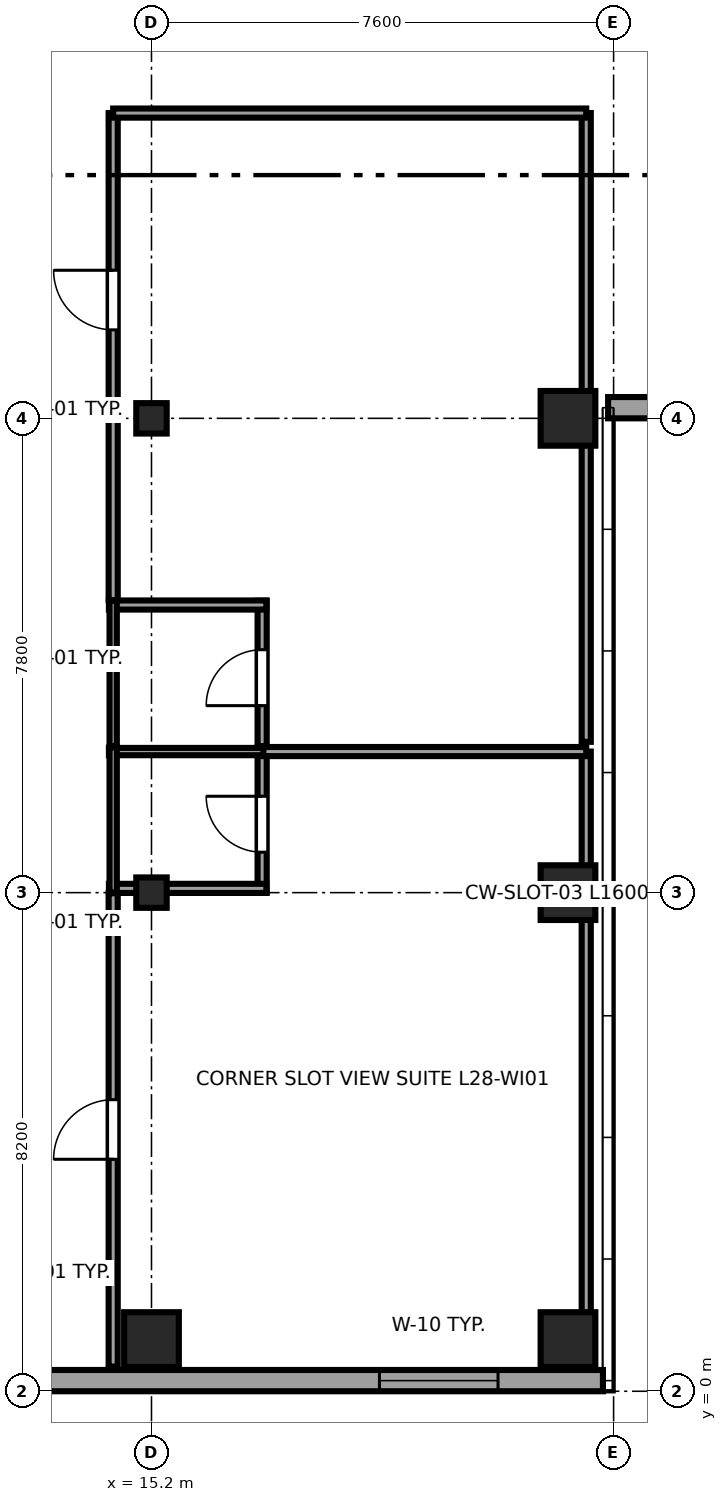
"""IFC4 building model, lengths in metres.
Left out: names, types, materials, properties, quantities, classifications, styles, units other than length and angle.
Written with IfcOpenShell. Run it as: python <this file> out.ifc"""

import sys

from ifc_helpers import new_model, si_unit, direction, frame, frame_2d, origin, origin_2d, place, context, subcontext, project, spatial, rectangle, i_section, extrude, source, transform, mapped, element, fill, save


model = new_model("IFC4")
c1 = context("Model", 3, precision=1e-05, world=origin(), true_north=direction((0.0, 1.0)))
c2 = subcontext(c1, "Body", "Model", "MODEL_VIEW")
j1 = project(units=[si_unit("LENGTHUNIT", "METRE"), si_unit("PLANEANGLEUNIT", "RADIAN")], contexts=[c1])
p1 = place(None, origin())
s1 = spatial("IfcSite", under=j1, at=p1, CompositionType="ELEMENT")
p2 = place(p1, origin())
s2 = spatial("IfcBuilding", under=s1, at=p2, CompositionType="ELEMENT")
p3 = place(p2, frame((0.0, 0.0, 111.55)))
s3 = spatial("IfcBuildingStorey", under=s2, at=p3, CompositionType="ELEMENT", Elevation=111.55)
m1 = source(origin(), c2, "Body", "SweptSolid", [
    extrude(rectangle(XDim=0.9, YDim=0.9, at=origin_2d()), origin(), (0.0, 0.0, 1.0), 3.55),
])
p4 = place(p3, frame((15.2, 0.85, 0.0), z_axis=(0.0, 0.0, 1.0), x_axis=(1.0, 0.0, 0.0)))
e1 = element("IfcColumn", 1, at=p4, inside=s3, PredefinedType="COLUMN", context=c2, shape_type="MappedRepresentation", body=[
    mapped(m1, transform((0.0, 0.0, 0.0), x_axis=(1.0, 0.0, 0.0), y_axis=(0.0, 1.0, 0.0), z_axis=(0.0, 0.0, 1.0), scale=1.0)),
])
m2 = source(origin(), c2, "Body", "SweptSolid", [
    extrude(i_section(OverallWidth=0.5, OverallDepth=0.5, WebThickness=0.022, FlangeThickness=0.034, at=origin_2d()), origin(), (0.0, 0.0, 1.0), 3.55),
])
for number, where, z_axis, x_axis in (
    (2, (15.2, 8.2, 0.0), (0.0, 0.0, 1.0), (1.0, 0.0, 0.0)),
    (3, (15.2, 16.0, 0.0), (0.0, 0.0, 1.0), (1.0, 0.0, 0.0)),
):
    element("IfcColumn", number, at=place(p3, frame(where, z_axis=z_axis, x_axis=x_axis)), inside=s3, PredefinedType="COLUMN", context=c2, shape_type="MappedRepresentation", body=[
        mapped(m2, transform((0.0, 0.0, 0.0), x_axis=(1.0, 0.0, 0.0), y_axis=(0.0, 1.0, 0.0), z_axis=(0.0, 0.0, 1.0), scale=1.0)),
    ])
for number, where, z_axis, x_axis in (
    (4, (22.05, 0.85, 0.0), (0.0, 0.0, 1.0), (1.0, 0.0, 0.0)),
    (5, (22.05, 8.2, 0.0), (0.0, 0.0, 1.0), (1.0, 0.0, 0.0)),
    (6, (22.05, 16.0, 0.0), (0.0, 0.0, 1.0), (1.0, 0.0, 0.0)),
):
    element("IfcColumn", number, at=place(p3, frame(where, z_axis=z_axis, x_axis=x_axis)), inside=s3, PredefinedType="COLUMN", context=c2, shape_type="MappedRepresentation", body=[
        mapped(m1, transform((0.0, 0.0, 0.0), x_axis=(1.0, 0.0, 0.0), y_axis=(0.0, 1.0, 0.0), z_axis=(0.0, 0.0, 1.0), scale=1.0)),
    ])
p5 = place(p3, frame((4.617, 0.175, 0.0), z_axis=(0.0, 0.0, 1.0), x_axis=(1.0, 0.0, 0.0)))
e7 = element("IfcWall", 7, at=p5, inside=s3, PredefinedType="SOLIDWALL", context=c2, shape_type="SweptSolid", body=[
    extrude(rectangle(XDim=18.008, YDim=0.35, at=frame_2d((9.004, 0.0))), origin(), (0.0, 0.0, 1.0), 3.37),
])
p6 = place(p5, frame((5.378, 0.0, 0.68)))
e8 = element("IfcOpeningElement", 8, at=p6, cuts=e7, PredefinedType="OPENING", context=c2, shape_type="SweptSolid", body=[
    extrude(rectangle(XDim=1.95, YDim=1.82, at=frame_2d((0.975, 0.91))), frame((0.0, 0.185, 0.0), z_axis=(0.0, -1.0, 0.0), x_axis=(1.0, 0.0, 0.0)), (0.0, 0.0, 1.0), 0.37),
])
p7 = place(p5, frame((14.332, 0.0, 0.68)))
e9 = element("IfcOpeningElement", 9, at=p7, cuts=e7, PredefinedType="OPENING", context=c2, shape_type="SweptSolid", body=[
    extrude(rectangle(XDim=1.95, YDim=1.82, at=frame_2d((0.975, 0.91))), frame((0.0, 0.185, 0.0), z_axis=(0.0, -1.0, 0.0), x_axis=(1.0, 0.0, 0.0)), (0.0, 0.0, 1.0), 0.37),
])
p8 = place(p3, frame((22.71, 16.175, 0.0), z_axis=(0.0, 0.0, 1.0), x_axis=(1.0, 0.0, 0.0)))
e10 = element("IfcWall", 10, at=p8, inside=s3, PredefinedType="SOLIDWALL", context=c2, shape_type="SweptSolid", body=[
    extrude(rectangle(XDim=11.58, YDim=0.35, at=frame_2d((5.79, 0.0))), origin(), (0.0, 0.0, 1.0), 2.748),
])
p9 = place(p8, frame((2.22, 0.0, 0.68)))
e11 = element("IfcOpeningElement", 11, at=p9, cuts=e10, PredefinedType="OPENING", context=c2, shape_type="SweptSolid", body=[
    extrude(rectangle(XDim=1.95, YDim=1.82, at=frame_2d((0.975, 0.91))), frame((0.0, 0.185, 0.0), z_axis=(0.0, -1.0, 0.0), x_axis=(1.0, 0.0, 0.0)), (0.0, 0.0, 1.0), 0.37),
])
p10 = place(p8, frame((7.41, 0.0, 0.68)))
e12 = element("IfcOpeningElement", 12, at=p10, cuts=e10, PredefinedType="OPENING", context=c2, shape_type="SweptSolid", body=[
    extrude(rectangle(XDim=1.95, YDim=1.82, at=frame_2d((0.975, 0.91))), frame((0.0, 0.185, 0.0), z_axis=(0.0, -1.0, 0.0), x_axis=(1.0, 0.0, 0.0)), (0.0, 0.0, 1.0), 0.37),
])
p11 = place(p3, frame((17.02, 8.2, 0.0), z_axis=(0.0, 0.0, 1.0), x_axis=(0.0, 1.0, 0.0)))
e13 = element("IfcWall", 13, at=p11, inside=s3, PredefinedType="PARTITIONING", context=c2, shape_type="SweptSolid", body=[
    extrude(rectangle(XDim=2.39, YDim=0.15, at=frame_2d((1.195, 0.0))), origin(), (0.0, 0.0, 1.0), 3.37),
])
p12 = place(p11, frame((0.665, 0.0, 0.0)))
e14 = element("IfcOpeningElement", 14, at=p12, cuts=e13, PredefinedType="OPENING", context=c2, shape_type="SweptSolid", body=[
    extrude(rectangle(XDim=0.92, YDim=2.01, at=frame_2d((0.46, 1.005))), frame((0.0, 0.085, 0.0), z_axis=(0.0, -1.0, 0.0), x_axis=(1.0, 0.0, 0.0)), (0.0, 0.0, 1.0), 0.17),
])
p13 = place(p3, frame((14.5, 8.27, 0.0), z_axis=(0.0, 0.0, 1.0), x_axis=(1.0, 0.0, 0.0)))
e15 = element("IfcWall", 15, at=p13, inside=s3, PredefinedType="PARTITIONING", context=c2, shape_type="SweptSolid", body=[
    extrude(rectangle(XDim=2.59, YDim=0.15, at=frame_2d((1.295, 0.0))), origin(), (0.0, 0.0, 1.0), 2.748),
])
p14 = place(p3, frame((14.5, 10.52, 0.0), z_axis=(0.0, 0.0, 1.0), x_axis=(1.0, 0.0, 0.0)))
e16 = element("IfcWall", 16, at=p14, inside=s3, PredefinedType="PLUMBINGWALL", context=c2, shape_type="SweptSolid", body=[
    extrude(rectangle(XDim=2.59, YDim=0.12, at=frame_2d((1.295, 0.0))), origin(), (0.0, 0.0, 1.0), 3.37),
])
p15 = place(p3, frame((14.57, 8.2, 0.0), z_axis=(0.0, 0.0, 1.0), x_axis=(0.0, 1.0, 0.0)))
e17 = element("IfcWall", 17, at=p15, inside=s3, PredefinedType="PLUMBINGWALL", context=c2, shape_type="SweptSolid", body=[
    extrude(rectangle(XDim=2.39, YDim=0.12, at=frame_2d((1.195, 0.0))), origin(), (0.0, 0.0, 1.0), 3.37),
])
p16 = place(p3, frame((17.02, 10.61, 0.0), z_axis=(0.0, 0.0, 1.0), x_axis=(0.0, 1.0, 0.0)))
e18 = element("IfcWall", 18, at=p16, inside=s3, PredefinedType="PARTITIONING", context=c2, shape_type="SweptSolid", body=[
    extrude(rectangle(XDim=2.39, YDim=0.15, at=frame_2d((1.195, 0.0))), origin(), (0.0, 0.0, 1.0), 3.37),
])
p17 = place(p16, frame((0.665, 0.0, 0.0)))
e19 = element("IfcOpeningElement", 19, at=p17, cuts=e18, PredefinedType="OPENING", context=c2, shape_type="SweptSolid", body=[
    extrude(rectangle(XDim=0.92, YDim=2.01, at=frame_2d((0.46, 1.005))), frame((0.0, 0.085, 0.0), z_axis=(0.0, -1.0, 0.0), x_axis=(1.0, 0.0, 0.0)), (0.0, 0.0, 1.0), 0.17),
])
p18 = place(p3, frame((14.5, 12.93, 0.0), z_axis=(0.0, 0.0, 1.0), x_axis=(1.0, 0.0, 0.0)))
e20 = element("IfcWall", 20, at=p18, inside=s3, PredefinedType="PARTITIONING", context=c2, shape_type="SweptSolid", body=[
    extrude(rectangle(XDim=2.59, YDim=0.15, at=frame_2d((1.295, 0.0))), origin(), (0.0, 0.0, 1.0), 3.37),
])
p19 = place(p3, frame((14.57, 10.61, 0.0), z_axis=(0.0, 0.0, 1.0), x_axis=(0.0, 1.0, 0.0)))
e21 = element("IfcWall", 21, at=p19, inside=s3, PredefinedType="PLUMBINGWALL", context=c2, shape_type="SweptSolid", body=[
    extrude(rectangle(XDim=2.39, YDim=0.12, at=frame_2d((1.195, 0.0))), origin(), (0.0, 0.0, 1.0), 3.37),
])
p20 = place(p3, frame((14.57, 0.405, 0.0), z_axis=(0.0, 0.0, 1.0), x_axis=(0.0, 1.0, 0.0)))
e22 = element("IfcWall", 22, at=p20, inside=s3, PredefinedType="PARTITIONING", context=c2, shape_type="SweptSolid", body=[
    extrude(rectangle(XDim=7.785, YDim=0.15, at=frame_2d((3.893, 0.0))), origin(), (0.0, 0.0, 1.0), 3.37),
])
p21 = place(p20, frame((3.41, 0.0, 0.0)))
e23 = element("IfcOpeningElement", 23, at=p21, cuts=e22, PredefinedType="OPENING", context=c2, shape_type="SweptSolid", body=[
    extrude(rectangle(XDim=0.98, YDim=2.12, at=frame_2d((0.49, 1.06))), frame((0.0, 0.085, 0.0), z_axis=(0.0, -1.0, 0.0), x_axis=(1.0, 0.0, 0.0)), (0.0, 0.0, 1.0), 0.17),
])
p22 = place(p3, frame((22.35, 0.405, 0.0), z_axis=(0.0, 0.0, 1.0), x_axis=(0.0, 1.0, 0.0)))
e24 = element("IfcWall", 24, at=p22, inside=s3, PredefinedType="PARTITIONING", context=c2, shape_type="SweptSolid", body=[
    extrude(rectangle(XDim=10.115, YDim=0.15, at=frame_2d((5.058, 0.0))), origin(), (0.0, 0.0, 1.0), 3.37),
])
p23 = place(p3, frame((17.04, 10.52, 0.0), z_axis=(0.0, 0.0, 1.0), x_axis=(1.0, 0.0, 0.0)))
e25 = element("IfcWall", 25, at=p23, inside=s3, PredefinedType="PARTITIONING", context=c2, shape_type="SweptSolid", body=[
    extrude(rectangle(XDim=5.31, YDim=0.15, at=frame_2d((2.655, 0.0))), origin(), (0.0, 0.0, 1.0), 3.37),
])
p24 = place(p3, frame((14.57, 13.01, 0.0), z_axis=(0.0, 0.0, 1.0), x_axis=(0.0, 1.0, 0.0)))
e26 = element("IfcWall", 26, at=p24, inside=s3, PredefinedType="PARTITIONING", context=c2, shape_type="SweptSolid", body=[
    extrude(rectangle(XDim=8.01, YDim=0.15, at=frame_2d((4.005, 0.0))), origin(), (0.0, 0.0, 1.0), 3.37),
])
p25 = place(p24, frame((4.445, 0.0, 0.0)))
e27 = element("IfcOpeningElement", 27, at=p25, cuts=e26, PredefinedType="OPENING", context=c2, shape_type="SweptSolid", body=[
    extrude(rectangle(XDim=0.98, YDim=2.12, at=frame_2d((0.49, 1.06))), frame((0.0, 0.085, 0.0), z_axis=(0.0, -1.0, 0.0), x_axis=(1.0, 0.0, 0.0)), (0.0, 0.0, 1.0), 0.17),
])
p26 = place(p3, frame((22.35, 10.68, 0.0), z_axis=(0.0, 0.0, 1.0), x_axis=(0.0, 1.0, 0.0)))
e28 = element("IfcWall", 28, at=p26, inside=s3, PredefinedType="PARTITIONING", context=c2, shape_type="SweptSolid", body=[
    extrude(rectangle(XDim=10.34, YDim=0.15, at=frame_2d((5.17, 0.0))), origin(), (0.0, 0.0, 1.0), 3.37),
])
p27 = place(p3, frame((14.57, 21.02, 0.0), z_axis=(0.0, 0.0, 1.0), x_axis=(1.0, 0.0, 0.0)))
e29 = element("IfcWall", 29, at=p27, inside=s3, PredefinedType="PARTITIONING", context=c2, shape_type="SweptSolid", body=[
    extrude(rectangle(XDim=7.78, YDim=0.15, at=frame_2d((3.89, 0.0))), origin(), (0.0, 0.0, 1.0), 3.37),
])
m3 = source(origin(), c2, "Body", "SweptSolid", [
    extrude(rectangle(XDim=1.95, YDim=1.82, at=frame_2d((0.975, 0.91))), frame((0.0, 0.09, 0.0), z_axis=(0.0, -1.0, 0.0), x_axis=(1.0, 0.0, 0.0)), (0.0, 0.0, 1.0), 0.06),
])
p28 = place(p7, origin())
e30 = element("IfcWindow", 30, at=p28, inside=s3, PartitioningType="DOUBLE_PANEL_VERTICAL", PredefinedType="WINDOW", context=c2, shape_type="MappedRepresentation", body=[
    mapped(m3, transform((0.0, 0.0, 0.0), x_axis=(1.0, 0.0, 0.0), y_axis=(0.0, 1.0, 0.0), z_axis=(0.0, 0.0, 1.0), scale=1.0)),
])
fill(e9, e30)
m4 = source(origin(), c2, "Body", "SweptSolid", [
    extrude(rectangle(XDim=0.92, YDim=2.01, at=frame_2d((0.46, 1.005))), frame((0.0, 0.025, 0.0), z_axis=(0.0, -1.0, 0.0), x_axis=(1.0, 0.0, 0.0)), (0.0, 0.0, 1.0), 0.05),
])
p29 = place(p12, origin())
e31 = element("IfcDoor", 31, at=p29, inside=s3, OperationType="SINGLE_SWING_RIGHT", PredefinedType="DOOR", context=c2, shape_type="MappedRepresentation", body=[
    mapped(m4, transform((0.0, 0.0, 0.0), x_axis=(1.0, 0.0, 0.0), y_axis=(0.0, 1.0, 0.0), z_axis=(0.0, 0.0, 1.0), scale=1.0)),
])
fill(e14, e31)
p30 = place(p17, origin())
e32 = element("IfcDoor", 32, at=p30, inside=s3, OperationType="SINGLE_SWING_LEFT", PredefinedType="DOOR", context=c2, shape_type="MappedRepresentation", body=[
    mapped(m4, transform((0.0, 0.0, 0.0), x_axis=(1.0, 0.0, 0.0), y_axis=(0.0, 1.0, 0.0), z_axis=(0.0, 0.0, 1.0), scale=1.0)),
])
fill(e19, e32)
m5 = source(origin(), c2, "Body", "SweptSolid", [
    extrude(rectangle(XDim=0.98, YDim=2.12, at=frame_2d((0.49, 1.06))), frame((0.0, 0.025, 0.0), z_axis=(0.0, -1.0, 0.0), x_axis=(1.0, 0.0, 0.0)), (0.0, 0.0, 1.0), 0.05),
])
p31 = place(p21, origin())
e33 = element("IfcDoor", 33, at=p31, inside=s3, OperationType="SINGLE_SWING_LEFT", PredefinedType="DOOR", context=c2, shape_type="MappedRepresentation", body=[
    mapped(m5, transform((0.0, 0.0, 0.0), x_axis=(1.0, 0.0, 0.0), y_axis=(0.0, 1.0, 0.0), z_axis=(0.0, 0.0, 1.0), scale=1.0)),
])
fill(e23, e33)
p32 = place(p25, origin())
e34 = element("IfcDoor", 34, at=p32, inside=s3, OperationType="SINGLE_SWING_RIGHT", PredefinedType="DOOR", context=c2, shape_type="MappedRepresentation", body=[
    mapped(m5, transform((0.0, 0.0, 0.0), x_axis=(1.0, 0.0, 0.0), y_axis=(0.0, 1.0, 0.0), z_axis=(0.0, 0.0, 1.0), scale=1.0)),
])
fill(e27, e34)
save(model, sys.argv[1])
